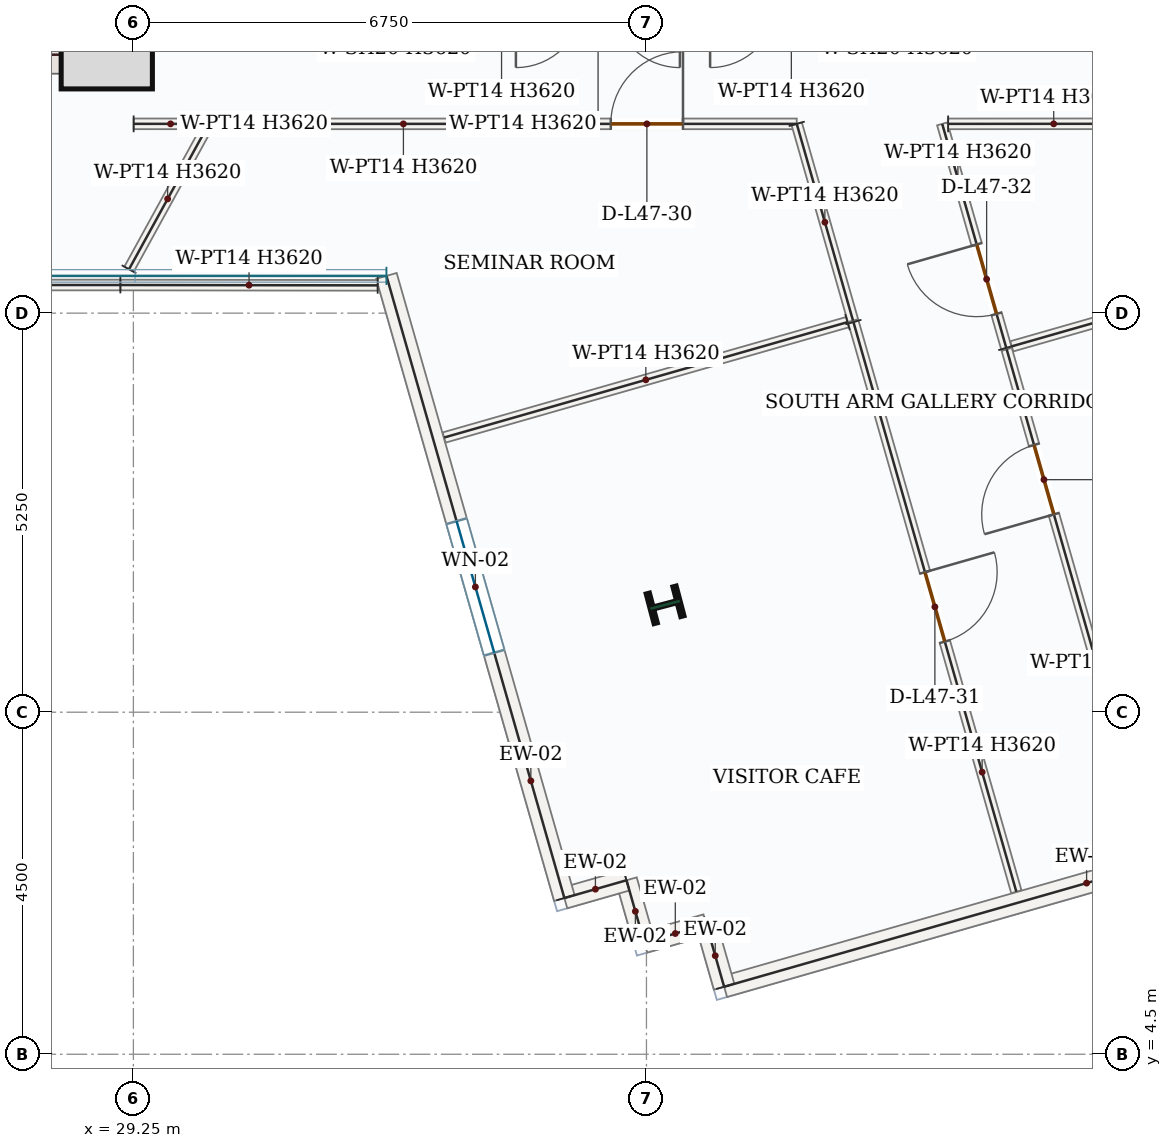
"""IFC4 building model, lengths in metres.
Left out: names, types, materials, properties, quantities, classifications, styles, units other than length and angle.
Written with IfcOpenShell. Run it as: python <this file> out.ifc"""

import sys

from ifc_helpers import new_model, si_unit, direction, frame, frame_2d, origin, origin_2d, place, context, subcontext, project, spatial, rectangle, i_section, extrude, source, transform, mapped, element, fill, save


model = new_model("IFC4")
c1 = context("Model", 3, precision=1e-05, world=origin(), true_north=direction((0.0, 1.0)))
c2 = subcontext(c1, "Body", "Model", "MODEL_VIEW")
j1 = project(units=[si_unit("LENGTHUNIT", "METRE"), si_unit("PLANEANGLEUNIT", "RADIAN")], contexts=[c1])
p1 = place(None, origin())
s1 = spatial("IfcSite", under=j1, at=p1, CompositionType="ELEMENT")
p2 = place(p1, origin())
s2 = spatial("IfcBuilding", under=s1, at=p2, CompositionType="ELEMENT")
p3 = place(p2, frame((0.0, 0.0, 201.9)))
s3 = spatial("IfcBuildingStorey", under=s2, at=p3, CompositionType="ELEMENT", Elevation=201.9)
p4 = place(p3, frame((29.0, 17.4, 0.0), z_axis=(0.0, 0.0, 1.0), x_axis=(0.0, 1.0, 0.0)))
e1 = element("IfcWall", 1, at=p4, inside=s3, PredefinedType="SHEAR", context=c2, shape_type="SweptSolid", body=[
    extrude(rectangle(XDim=8.55, YDim=0.5, at=frame_2d((4.275, 0.0))), origin(), (0.0, 0.0, 1.0), 3.62),
])
p5 = place(p4, frame((6.65, 0.0, 0.0)))
e2 = element("IfcOpeningElement", 2, at=p5, cuts=e1, PredefinedType="OPENING", context=c2, shape_type="SweptSolid", body=[
    extrude(rectangle(XDim=1.1, YDim=2.2, at=frame_2d((0.55, 1.1))), frame((0.0, 0.26, 0.0), z_axis=(0.0, -1.0, 0.0), x_axis=(1.0, 0.0, 0.0)), (0.0, 0.0, 1.0), 0.52),
])
p6 = place(p4, frame((2.7, 0.0, 0.0)))
e3 = element("IfcOpeningElement", 3, at=p6, cuts=e1, PredefinedType="OPENING", context=c2, shape_type="SweptSolid", body=[
    extrude(rectangle(XDim=0.88, YDim=2.1, at=frame_2d((0.44, 1.05))), frame((0.0, 0.26, 0.0), z_axis=(0.0, -1.0, 0.0), x_axis=(1.0, 0.0, 0.0)), (0.0, 0.0, 1.0), 0.52),
])
p7 = place(p4, frame((4.6, 0.0, 0.0)))
e4 = element("IfcOpeningElement", 4, at=p7, cuts=e1, PredefinedType="OPENING", context=c2, shape_type="SweptSolid", body=[
    extrude(rectangle(XDim=0.88, YDim=2.1, at=frame_2d((0.44, 1.05))), frame((0.0, 0.26, 0.0), z_axis=(0.0, -1.0, 0.0), x_axis=(1.0, 0.0, 0.0)), (0.0, 0.0, 1.0), 0.52),
])
m1 = source(origin(), c2, "Body", "SweptSolid", [
    extrude(rectangle(XDim=7.0, YDim=0.5, at=frame_2d((3.5, 0.0))), origin(), (0.0, 0.0, 1.0), 3.62),
])
p8 = place(p3, frame((21.75, 17.65, 0.0), z_axis=(0.0, 0.0, 1.0), x_axis=(1.0, 0.0, 0.0)))
e5 = element("IfcWall", 5, at=p8, inside=s3, PredefinedType="SHEAR", context=c2, shape_type="MappedRepresentation", body=[
    mapped(m1, transform((0.0, 0.0, 0.0), x_axis=(1.0, 0.0, 0.0), y_axis=(0.0, 1.0, 0.0), z_axis=(0.0, 0.0, 1.0), scale=1.0)),
])
m2 = source(origin(), c2, "Body", "SweptSolid", [
    extrude(rectangle(XDim=1.2, YDim=1.2, at=origin_2d()), origin(), (0.0, 0.0, 1.0), 3.9),
])
p9 = place(p3, frame((28.9, 17.8, 0.0), z_axis=(0.0, 0.0, 1.0), x_axis=(1.0, 0.0, 0.0)))
e6 = element("IfcColumn", 6, at=p9, inside=s3, PredefinedType="COLUMN", context=c2, shape_type="MappedRepresentation", body=[
    mapped(m2, transform((0.0, 0.0, 0.0), x_axis=(1.0, 0.0, 0.0), y_axis=(0.0, 1.0, 0.0), z_axis=(0.0, 0.0, 1.0), scale=1.0)),
])
m3 = source(origin(), c2, "Body", "SweptSolid", [
    extrude(i_section(OverallWidth=0.404, OverallDepth=0.407, WebThickness=0.027, FlangeThickness=0.044, FilletRadius=0.018, at=origin_2d()), origin(), (0.0, 0.0, 1.0), 3.9),
])
p10 = place(p3, frame((36.245, 10.412, 0.0), z_axis=(0.0, 0.0, 1.0), x_axis=(-0.255445757936, 0.966823388604, 0.0)))
e7 = element("IfcColumn", 7, at=p10, inside=s3, PredefinedType="COLUMN", context=c2, shape_type="MappedRepresentation", body=[
    mapped(m3, transform((0.0, 0.0, 0.0), x_axis=(1.0, 0.0, 0.0), y_axis=(0.0, 1.0, 0.0), z_axis=(0.0, 0.0, 1.0), scale=1.0)),
])
m4 = source(origin(), c2, "Body", "SweptSolid", [
    extrude(rectangle(XDim=9.92, YDim=0.28, at=frame_2d((4.96, 0.0))), origin(), (0.0, 0.0, 1.0), 3.62),
])
p11 = place(p3, frame((46.56, 8.115, 0.0), z_axis=(0.0, 0.0, 1.0), x_axis=(-0.961457051276, -0.274955157346, 0.0)))
e8 = element("IfcWall", 8, at=p11, inside=s3, PredefinedType="SOLIDWALL", context=c2, shape_type="MappedRepresentation", body=[
    mapped(m4, transform((0.0, 0.0, 0.0), x_axis=(1.0, 0.0, 0.0), y_axis=(0.0, 1.0, 0.0), z_axis=(0.0, 0.0, 1.0), scale=1.0)),
])
m5 = source(origin(), c2, "Body", "SweptSolid", [
    extrude(rectangle(XDim=0.85, YDim=0.28, at=frame_2d((0.425, 0.0))), origin(), (0.0, 0.0, 1.0), 3.62),
])
for number, where, z_axis, x_axis in (
    (9, (37.022, 5.388, 0.0), (0.0, 0.0, 1.0), (-0.275, 0.961, 0.0)),
    (10, (36.788, 6.205, 0.0), (0.0, 0.0, 1.0), (-0.961, -0.275, 0.0)),
):
    element("IfcWall", number, at=place(p3, frame(where, z_axis=z_axis, x_axis=x_axis)), inside=s3, PredefinedType="SOLIDWALL", context=c2, shape_type="MappedRepresentation", body=[
        mapped(m5, transform((0.0, 0.0, 0.0), x_axis=(1.0, 0.0, 0.0), y_axis=(0.0, 1.0, 0.0), z_axis=(0.0, 0.0, 1.0), scale=1.0)),
    ])
m6 = source(origin(), c2, "Body", "SweptSolid", [
    extrude(rectangle(XDim=0.85, YDim=0.28, at=frame_2d((0.425, 0.0))), origin(), (0.0, 0.0, 1.0), 3.62),
])
p12 = place(p3, frame((35.971, 5.971, 0.0), z_axis=(0.0, 0.0, 1.0), x_axis=(-0.274834915789, 0.961491429532, 0.0)))
e11 = element("IfcWall", 11, at=p12, inside=s3, PredefinedType="SOLIDWALL", context=c2, shape_type="MappedRepresentation", body=[
    mapped(m6, transform((0.0, 0.0, 0.0), x_axis=(1.0, 0.0, 0.0), y_axis=(0.0, 1.0, 0.0), z_axis=(0.0, 0.0, 1.0), scale=1.0)),
])
p13 = place(p3, frame((35.737, 6.789, 0.0), z_axis=(0.0, 0.0, 1.0), x_axis=(-0.961393768724, -0.275176346112, 0.0)))
e12 = element("IfcWall", 12, at=p13, inside=s3, PredefinedType="SOLIDWALL", context=c2, shape_type="MappedRepresentation", body=[
    mapped(m5, transform((0.0, 0.0, 0.0), x_axis=(1.0, 0.0, 0.0), y_axis=(0.0, 1.0, 0.0), z_axis=(0.0, 0.0, 1.0), scale=1.0)),
])
p14 = place(p3, frame((34.92, 6.555, 0.0), z_axis=(0.0, 0.0, 1.0), x_axis=(-0.27496352843, 0.961454657295, 0.0)))
e13 = element("IfcWall", 13, at=p14, inside=s3, PredefinedType="SOLIDWALL", context=c2, shape_type="SweptSolid", body=[
    extrude(rectangle(XDim=8.513, YDim=0.28, at=frame_2d((4.257, 0.0))), origin(), (0.0, 0.0, 1.0), 3.62),
])
p15 = place(p14, frame((3.357, 0.0, 0.85)))
e14 = element("IfcOpeningElement", 14, at=p15, cuts=e13, PredefinedType="OPENING", context=c2, shape_type="SweptSolid", body=[
    extrude(rectangle(XDim=1.8, YDim=1.75, at=frame_2d((0.9, 0.875))), frame((0.0, 0.15, 0.0), z_axis=(0.0, -1.0, 0.0), x_axis=(1.0, 0.0, 0.0)), (0.0, 0.0, 1.0), 0.3),
])
p16 = place(p3, frame((40.734, 13.792, 0.0), z_axis=(0.0, 0.0, 1.0), x_axis=(-0.274984067599, 0.961448783122, 0.0)))
e15 = element("IfcWall", 15, at=p16, inside=s3, PredefinedType="PARTITIONING", context=c2, shape_type="SweptSolid", body=[
    extrude(rectangle(XDim=3.066, YDim=0.14, at=frame_2d((1.533, 0.0))), origin(), (0.0, 0.0, 1.0), 3.62),
])
p17 = place(p16, frame((0.465, 0.0, 0.0)))
e16 = element("IfcOpeningElement", 16, at=p17, cuts=e15, PredefinedType="OPENING", context=c2, shape_type="SweptSolid", body=[
    extrude(rectangle(XDim=0.95, YDim=2.15, at=frame_2d((0.475, 1.075))), frame((0.0, 0.08, 0.0), z_axis=(0.0, -1.0, 0.0), x_axis=(1.0, 0.0, 0.0)), (0.0, 0.0, 1.0), 0.16),
])
m7 = source(origin(), c2, "Body", "SweptSolid", [
    extrude(rectangle(XDim=2.778, YDim=0.14, at=frame_2d((1.389, 0.0))), origin(), (0.0, 0.0, 1.0), 3.079),
])
p18 = place(p3, frame((39.969, 16.74, 0.0), z_axis=(0.0, 0.0, 1.0), x_axis=(0.999999903427, 0.000439483125, 0.0)))
e17 = element("IfcWall", 17, at=p18, inside=s3, PredefinedType="PARTITIONING", context=c2, shape_type="MappedRepresentation", body=[
    mapped(m7, transform((0.0, 0.0, 0.0), x_axis=(1.0, 0.0, 0.0), y_axis=(0.0, 1.0, 0.0), z_axis=(0.0, 0.0, 1.0), scale=1.0)),
])
m8 = source(origin(), c2, "Body", "SweptSolid", [
    extrude(rectangle(XDim=10.785, YDim=0.14, at=frame_2d((5.393, 0.0))), origin(), (0.0, 0.0, 1.0), 3.079),
])
p19 = place(p3, frame((51.176, 16.779, 0.0), z_axis=(0.0, 0.0, 1.0), x_axis=(-0.961454726908, -0.274963285016, 0.0)))
e18 = element("IfcWall", 18, at=p19, inside=s3, PredefinedType="PARTITIONING", context=c2, shape_type="MappedRepresentation", body=[
    mapped(m8, transform((0.0, 0.0, 0.0), x_axis=(1.0, 0.0, 0.0), y_axis=(0.0, 1.0, 0.0), z_axis=(0.0, 0.0, 1.0), scale=1.0)),
])
p20 = place(p3, frame((30.225, 16.74, 0.0), z_axis=(0.0, 0.0, 1.0), x_axis=(1.0, 0.0, 0.0)))
e19 = element("IfcWall", 19, at=p20, inside=s3, PredefinedType="PARTITIONING", context=c2, shape_type="SweptSolid", body=[
    extrude(rectangle(XDim=7.753, YDim=0.14, at=frame_2d((3.876, 0.0))), origin(), (0.0, 0.0, 1.0), 3.62),
])
p21 = place(p20, frame((5.306, 0.0, 0.0)))
e20 = element("IfcOpeningElement", 20, at=p21, cuts=e19, PredefinedType="OPENING", context=c2, shape_type="SweptSolid", body=[
    extrude(rectangle(XDim=0.95, YDim=2.15, at=frame_2d((0.475, 1.075))), frame((0.0, 0.08, 0.0), z_axis=(0.0, -1.0, 0.0), x_axis=(1.0, 0.0, 0.0)), (0.0, 0.0, 1.0), 0.16),
])
m9 = source(origin(), c2, "Body", "SweptSolid", [
    extrude(rectangle(XDim=2.692, YDim=0.14, at=frame_2d((1.346, 0.0))), origin(), (0.0, 0.0, 1.0), 3.62),
])
p22 = place(p3, frame((37.977, 16.74, 0.0), z_axis=(0.0, 0.0, 1.0), x_axis=(0.27500862401, -0.961441759401, 0.0)))
e21 = element("IfcWall", 21, at=p22, inside=s3, PredefinedType="PARTITIONING", context=c2, shape_type="MappedRepresentation", body=[
    mapped(m9, transform((0.0, 0.0, 0.0), x_axis=(1.0, 0.0, 0.0), y_axis=(0.0, 1.0, 0.0), z_axis=(0.0, 0.0, 1.0), scale=1.0)),
])
m10 = source(origin(), c2, "Body", "SweptSolid", [
    extrude(rectangle(XDim=5.52, YDim=0.14, at=frame_2d((2.76, 0.0))), origin(), (0.0, 0.0, 1.0), 3.62),
])
p23 = place(p3, frame((38.646, 14.131, 0.0), z_axis=(0.0, 0.0, 1.0), x_axis=(-0.961455490798, -0.274960613933, 0.0)))
e22 = element("IfcWall", 22, at=p23, inside=s3, PredefinedType="PARTITIONING", context=c2, shape_type="MappedRepresentation", body=[
    mapped(m10, transform((0.0, 0.0, 0.0), x_axis=(1.0, 0.0, 0.0), y_axis=(0.0, 1.0, 0.0), z_axis=(0.0, 0.0, 1.0), scale=1.0)),
])
m11 = source(origin(), c2, "Body", "SweptSolid", [
    extrude(rectangle(XDim=3.385, YDim=0.14, at=frame_2d((1.693, 0.0))), origin(), (0.0, 0.0, 1.0), 3.62),
])
p24 = place(p3, frame((32.464, 14.615, 0.0), z_axis=(0.0, 0.0, 1.0), x_axis=(-0.999999061333, 0.001370158085, 0.0)))
e23 = element("IfcWall", 23, at=p24, inside=s3, PredefinedType="PARTITIONING", context=c2, shape_type="MappedRepresentation", body=[
    mapped(m11, transform((0.0, 0.0, 0.0), x_axis=(1.0, 0.0, 0.0), y_axis=(0.0, 1.0, 0.0), z_axis=(0.0, 0.0, 1.0), scale=1.0)),
])
m12 = source(origin(), c2, "Body", "SweptSolid", [
    extrude(rectangle(XDim=2.111, YDim=0.14, at=frame_2d((1.056, 0.0))), origin(), (0.0, 0.0, 1.0), 3.62),
])
p25 = place(p3, frame((29.193, 14.827, 0.0), z_axis=(0.0, 0.0, 1.0), x_axis=(0.481297142313, 0.876557505702, 0.0)))
e24 = element("IfcWall", 24, at=p25, inside=s3, PredefinedType="PARTITIONING", context=c2, shape_type="MappedRepresentation", body=[
    mapped(m12, transform((0.0, 0.0, 0.0), x_axis=(1.0, 0.0, 0.0), y_axis=(0.0, 1.0, 0.0), z_axis=(0.0, 0.0, 1.0), scale=1.0)),
])
p26 = place(p3, frame((42.635, 7.144, 0.0), z_axis=(0.0, 0.0, 1.0), x_axis=(-0.274973646468, 0.96145176361, 0.0)))
e25 = element("IfcWall", 25, at=p26, inside=s3, PredefinedType="PARTITIONING", context=c2, shape_type="SweptSolid", body=[
    extrude(rectangle(XDim=6.895, YDim=0.14, at=frame_2d((3.448, 0.0))), origin(), (0.0, 0.0, 1.0), 3.62),
])
p27 = place(p26, frame((4.637, 0.0, 0.0)))
e26 = element("IfcOpeningElement", 26, at=p27, cuts=e25, PredefinedType="OPENING", context=c2, shape_type="SweptSolid", body=[
    extrude(rectangle(XDim=0.95, YDim=2.15, at=frame_2d((0.475, 1.075))), frame((0.0, 0.08, 0.0), z_axis=(0.0, -1.0, 0.0), x_axis=(1.0, 0.0, 0.0)), (0.0, 0.0, 1.0), 0.16),
])
p28 = place(p3, frame((38.723, 14.133, 0.0), z_axis=(0.0, 0.0, 1.0), x_axis=(0.274985856522, -0.96144827147, 0.0)))
e27 = element("IfcWall", 27, at=p28, inside=s3, PredefinedType="PARTITIONING", context=c2, shape_type="SweptSolid", body=[
    extrude(rectangle(XDim=7.795, YDim=0.14, at=frame_2d((3.897, 0.0))), origin(), (0.0, 0.0, 1.0), 3.62),
])
p29 = place(p28, frame((3.423, 0.0, 0.0)))
e28 = element("IfcOpeningElement", 28, at=p29, cuts=e27, PredefinedType="OPENING", context=c2, shape_type="SweptSolid", body=[
    extrude(rectangle(XDim=0.95, YDim=2.15, at=frame_2d((0.475, 1.075))), frame((0.0, 0.08, 0.0), z_axis=(0.0, -1.0, 0.0), x_axis=(1.0, 0.0, 0.0)), (0.0, 0.0, 1.0), 0.16),
])
m13 = source(origin(), c2, "Body", "SweptSolid", [
    extrude(rectangle(XDim=0.971, YDim=0.14, at=frame_2d((0.486, 0.0))), origin(), (0.0, 0.0, 1.0), 3.62),
])
p30 = place(p3, frame((29.253, 16.74, 0.0), z_axis=(0.0, 0.0, 1.0), x_axis=(0.999999873614, -0.000502765145, 0.0)))
e29 = element("IfcWall", 29, at=p30, inside=s3, PredefinedType="PARTITIONING", context=c2, shape_type="MappedRepresentation", body=[
    mapped(m13, transform((0.0, 0.0, 0.0), x_axis=(1.0, 0.0, 0.0), y_axis=(0.0, 1.0, 0.0), z_axis=(0.0, 0.0, 1.0), scale=1.0)),
])
m14 = source(origin(), c2, "Body", "SweptSolid", [
    extrude(rectangle(XDim=6.47, YDim=0.14, at=frame_2d((3.235, 0.0))), origin(), (0.0, 0.0, 1.0), 3.62),
])
p31 = place(p3, frame((29.079, 14.62, 0.0), z_axis=(0.0, 0.0, 1.0), x_axis=(-1.0, 0.0, 0.0)))
e30 = element("IfcWall", 30, at=p31, inside=s3, PredefinedType="PARTITIONING", context=c2, shape_type="MappedRepresentation", body=[
    mapped(m14, transform((0.0, 0.0, 0.0), x_axis=(1.0, 0.0, 0.0), y_axis=(0.0, 1.0, 0.0), z_axis=(0.0, 0.0, 1.0), scale=1.0)),
])
m15 = source(origin(), c2, "Body", "SweptSolid", [
    extrude(rectangle(XDim=1.8, YDim=1.75, at=frame_2d((0.9, 0.875))), frame((0.0, 0.03, 0.0), z_axis=(0.0, -1.0, 0.0), x_axis=(1.0, 0.0, 0.0)), (0.0, 0.0, 1.0), 0.06),
])
p32 = place(p15, origin())
e31 = element("IfcWindow", 31, at=p32, inside=s3, PartitioningType="DOUBLE_PANEL_VERTICAL", PredefinedType="WINDOW", context=c2, shape_type="MappedRepresentation", body=[
    mapped(m15, transform((0.0, 0.0, 0.0), x_axis=(1.0, 0.0, 0.0), y_axis=(0.0, 1.0, 0.0), z_axis=(0.0, 0.0, 1.0), scale=1.0)),
])
fill(e14, e31)
m16 = source(origin(), c2, "Body", "SweptSolid", [
    extrude(rectangle(XDim=0.95, YDim=2.15, at=frame_2d((0.475, 1.075))), frame((0.0, 0.025, 0.0), z_axis=(0.0, -1.0, 0.0), x_axis=(1.0, 0.0, 0.0)), (0.0, 0.0, 1.0), 0.05),
])
p33 = place(p21, origin())
e32 = element("IfcDoor", 32, at=p33, inside=s3, OperationType="SINGLE_SWING_RIGHT", PredefinedType="DOOR", context=c2, shape_type="MappedRepresentation", body=[
    mapped(m16, transform((0.0, 0.0, 0.0), x_axis=(1.0, 0.0, 0.0), y_axis=(0.0, 1.0, 0.0), z_axis=(0.0, 0.0, 1.0), scale=1.0)),
])
fill(e20, e32)
p34 = place(p29, origin())
e33 = element("IfcDoor", 33, at=p34, inside=s3, OperationType="SINGLE_SWING_LEFT", PredefinedType="DOOR", context=c2, shape_type="MappedRepresentation", body=[
    mapped(m16, transform((0.0, 0.0, 0.0), x_axis=(1.0, 0.0, 0.0), y_axis=(0.0, 1.0, 0.0), z_axis=(0.0, 0.0, 1.0), scale=1.0)),
])
fill(e28, e33)
p35 = place(p17, origin())
e34 = element("IfcDoor", 34, at=p35, inside=s3, OperationType="SINGLE_SWING_RIGHT", PredefinedType="DOOR", context=c2, shape_type="MappedRepresentation", body=[
    mapped(m16, transform((0.0, 0.0, 0.0), x_axis=(1.0, 0.0, 0.0), y_axis=(0.0, 1.0, 0.0), z_axis=(0.0, 0.0, 1.0), scale=1.0)),
])
fill(e16, e34)
p36 = place(p27, origin())
e35 = element("IfcDoor", 35, at=p36, inside=s3, OperationType="SINGLE_SWING_LEFT", PredefinedType="DOOR", context=c2, shape_type="MappedRepresentation", body=[
    mapped(m16, transform((0.0, 0.0, 0.0), x_axis=(1.0, 0.0, 0.0), y_axis=(0.0, 1.0, 0.0), z_axis=(0.0, 0.0, 1.0), scale=1.0)),
])
fill(e26, e35)
save(model, sys.argv[1])
